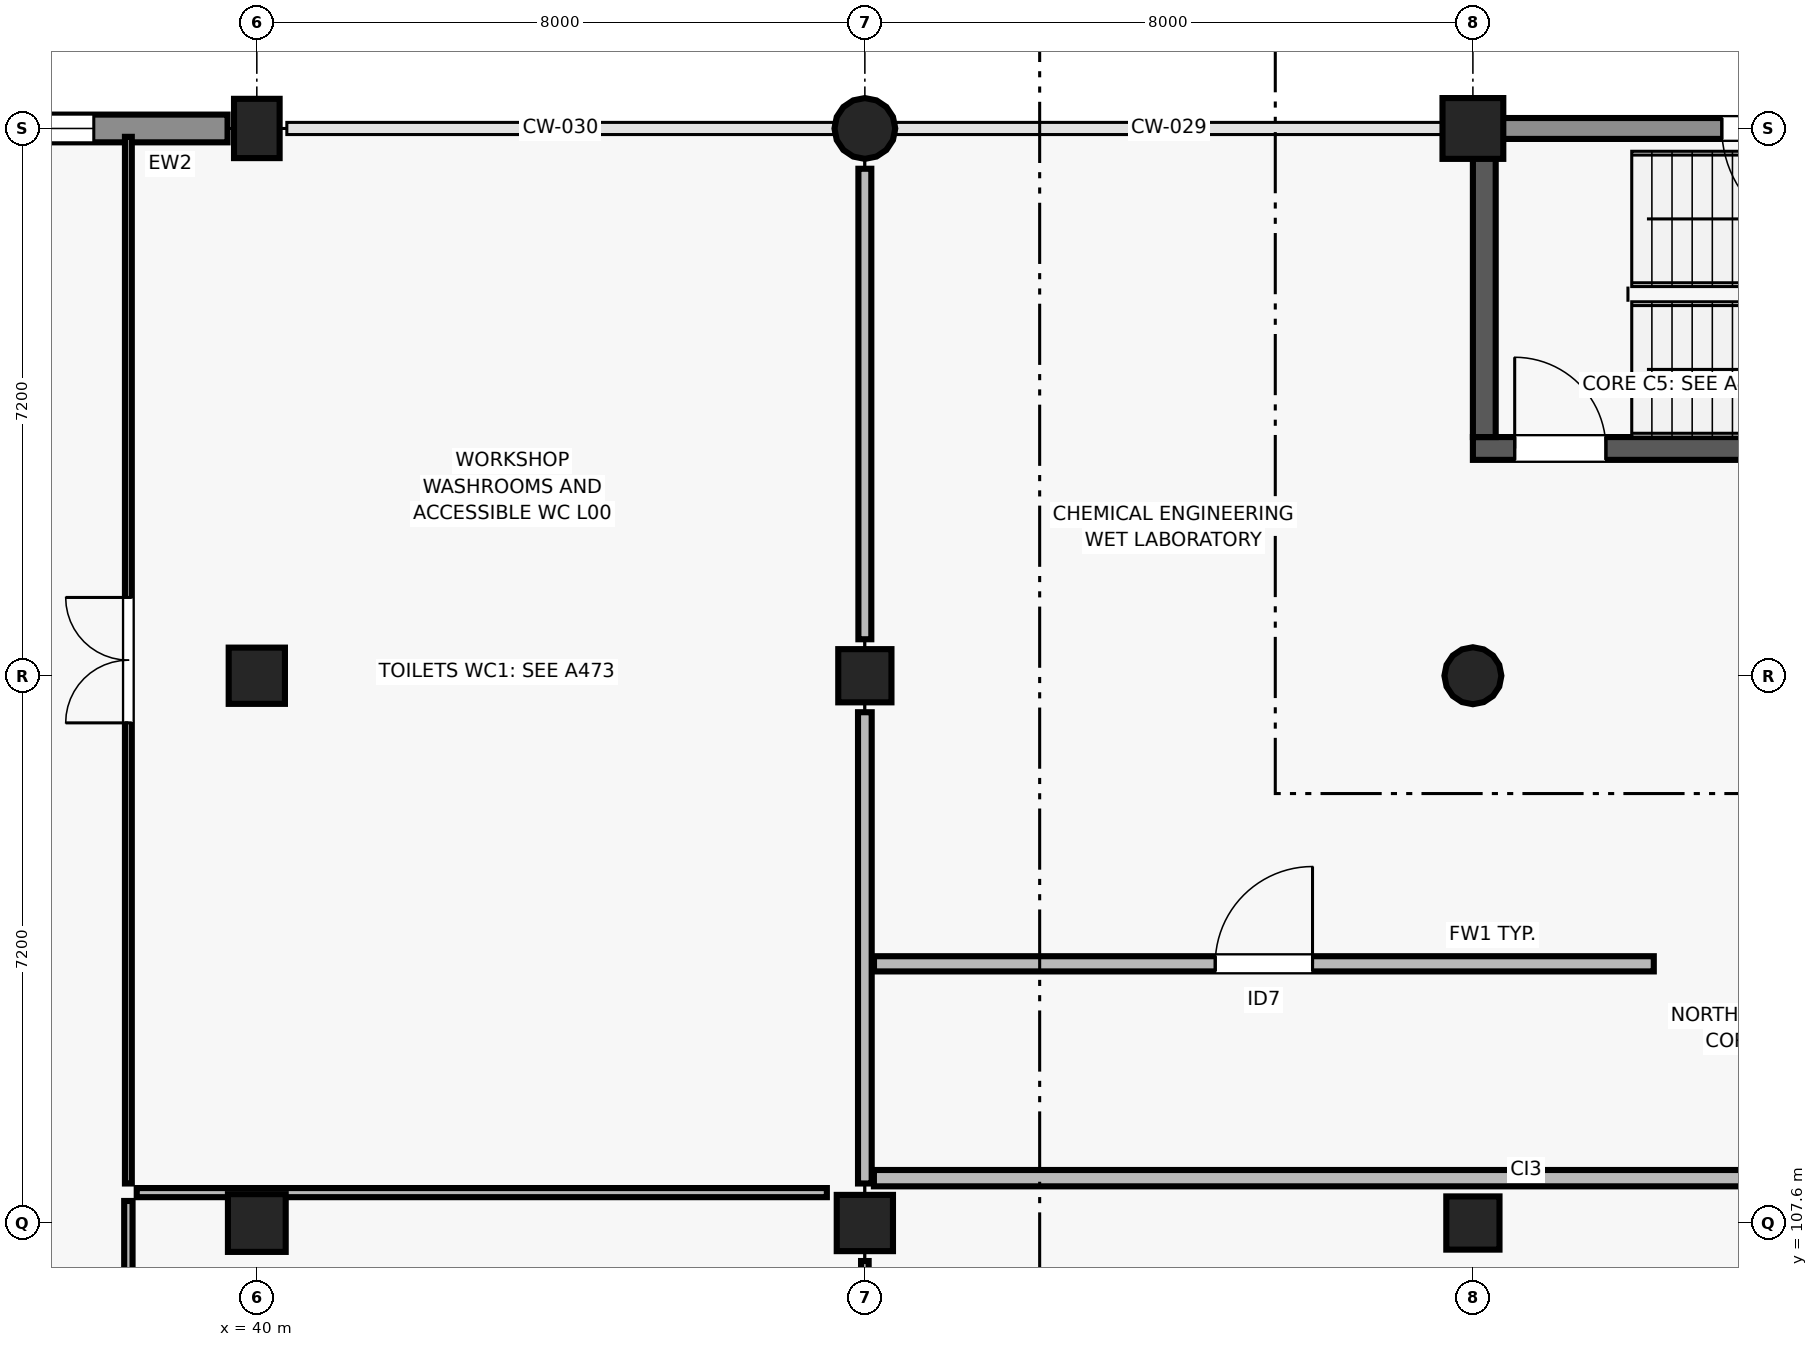
"""IFC4 building model, lengths in metres.
Left out: names, types, materials, properties, quantities, classifications, styles, units other than length and angle.
Written with IfcOpenShell. Run it as: python <this file> out.ifc"""

import sys

from ifc_helpers import new_model, si_unit, direction, frame, frame_2d, origin, origin_2d, place, context, subcontext, project, spatial, rectangle, circle, extrude, element, fill, save


model = new_model("IFC4")
c1 = context("Model", 3, precision=1e-05, world=origin(), true_north=direction((0.0, 1.0)))
c2 = subcontext(c1, "Body", "Model", "MODEL_VIEW")
j1 = project(units=[si_unit("LENGTHUNIT", "METRE"), si_unit("PLANEANGLEUNIT", "RADIAN")], contexts=[c1])
p1 = place(None, origin())
s1 = spatial("IfcSite", under=j1, at=p1, CompositionType="ELEMENT")
p2 = place(p1, origin())
s2 = spatial("IfcBuilding", under=s1, at=p2, CompositionType="ELEMENT")
p3 = place(p2, origin())
s3 = spatial("IfcBuildingStorey", under=s2, at=p3, CompositionType="ELEMENT", Elevation=0.0)
p4 = place(p3, frame((40.0, 107.6, 0.0), z_axis=(0.0, 0.0, 1.0), x_axis=(1.0, 0.0, 0.0)))
e1 = element("IfcColumn", 1, at=p4, inside=s3, PredefinedType="COLUMN", context=c2, shape_type="SweptSolid", body=[
    extrude(rectangle(XDim=0.76, YDim=0.76, at=origin_2d()), origin(), (0.0, 0.0, 1.0), 4.5),
])
p5 = place(p3, frame((40.0, 114.8, 0.0), z_axis=(0.0, 0.0, 1.0), x_axis=(1.0, 0.0, 0.0)))
e2 = element("IfcColumn", 2, at=p5, inside=s3, PredefinedType="COLUMN", context=c2, shape_type="SweptSolid", body=[
    extrude(rectangle(XDim=0.74, YDim=0.74, at=origin_2d()), origin(), (0.0, 0.0, 1.0), 4.5),
])
p6 = place(p3, frame((40.0, 122.0, 0.0), z_axis=(0.0, 0.0, 1.0), x_axis=(1.0, 0.0, 0.0)))
e3 = element("IfcColumn", 3, at=p6, inside=s3, PredefinedType="COLUMN", context=c2, shape_type="SweptSolid", body=[
    extrude(rectangle(XDim=0.78, YDim=0.6, at=origin_2d()), origin(), (0.0, 0.0, 1.0), 4.5),
])
p7 = place(p3, frame((48.0, 107.6, 0.0), z_axis=(0.0, 0.0, 1.0), x_axis=(1.0, 0.0, 0.0)))
e4 = element("IfcColumn", 4, at=p7, inside=s3, PredefinedType="COLUMN", context=c2, shape_type="SweptSolid", body=[
    extrude(rectangle(XDim=0.74, YDim=0.74, at=origin_2d()), origin(), (0.0, 0.0, 1.0), 4.5),
])
p8 = place(p3, frame((48.0, 114.8, 0.0), z_axis=(0.0, 0.0, 1.0), x_axis=(1.0, 0.0, 0.0)))
e5 = element("IfcColumn", 5, at=p8, inside=s3, PredefinedType="COLUMN", context=c2, shape_type="SweptSolid", body=[
    extrude(rectangle(XDim=0.7, YDim=0.7, at=origin_2d()), origin(), (0.0, 0.0, 1.0), 4.5),
])
p9 = place(p3, frame((48.0, 122.0, 0.0), z_axis=(0.0, 0.0, 1.0), x_axis=(1.0, 0.0, 0.0)))
e6 = element("IfcColumn", 6, at=p9, inside=s3, PredefinedType="COLUMN", context=c2, shape_type="SweptSolid", body=[
    extrude(circle(Radius=0.4, at=origin_2d()), origin(), (0.0, 0.0, 1.0), 4.5),
])
p10 = place(p3, frame((56.0, 107.6, 0.0), z_axis=(0.0, 0.0, 1.0), x_axis=(1.0, 0.0, 0.0)))
e7 = element("IfcColumn", 7, at=p10, inside=s3, PredefinedType="COLUMN", context=c2, shape_type="SweptSolid", body=[
    extrude(rectangle(XDim=0.7, YDim=0.7, at=origin_2d()), origin(), (0.0, 0.0, 1.0), 4.5),
])
p11 = place(p3, frame((56.0, 114.8, 0.0), z_axis=(0.0, 0.0, 1.0), x_axis=(1.0, 0.0, 0.0)))
e8 = element("IfcColumn", 8, at=p11, inside=s3, PredefinedType="COLUMN", context=c2, shape_type="SweptSolid", body=[
    extrude(circle(Radius=0.375, at=origin_2d()), origin(), (0.0, 0.0, 1.0), 4.5),
])
p12 = place(p3, frame((56.0, 122.0, 0.0), z_axis=(0.0, 0.0, 1.0), x_axis=(1.0, 0.0, 0.0)))
e9 = element("IfcColumn", 9, at=p12, inside=s3, PredefinedType="COLUMN", context=c2, shape_type="SweptSolid", body=[
    extrude(rectangle(XDim=0.8, YDim=0.8, at=origin_2d()), origin(), (0.0, 0.0, 1.0), 4.5),
])
p13 = place(p3, frame((63.605, 122.0, 0.0), z_axis=(0.0, 0.0, 1.0), x_axis=(-1.0, 0.0, 0.0)))
e10 = element("IfcWall", 10, at=p13, inside=s3, PredefinedType="SOLIDWALL", context=c2, shape_type="SweptSolid", body=[
    extrude(rectangle(XDim=7.21, YDim=0.275, at=frame_2d((3.605, 0.0))), origin(), (0.0, 0.0, 1.0), 4.22),
])
p14 = place(p13, frame((2.88, 0.0, 0.0)))
e11 = element("IfcOpeningElement", 11, at=p14, cuts=e10, PredefinedType="OPENING", context=c2, shape_type="SweptSolid", body=[
    extrude(rectangle(XDim=1.45, YDim=2.2, at=frame_2d((0.725, 1.1))), frame((0.0, 0.147, 0.0), z_axis=(0.0, -1.0, 0.0), x_axis=(1.0, 0.0, 0.0)), (0.0, 0.0, 1.0), 0.295),
])
p15 = place(p3, frame((39.615, 122.0, 0.0), z_axis=(0.0, 0.0, 1.0), x_axis=(-1.0, 0.0, 0.0)))
e12 = element("IfcWall", 12, at=p15, inside=s3, PredefinedType="SOLIDWALL", context=c2, shape_type="SweptSolid", body=[
    extrude(rectangle(XDim=7.22, YDim=0.365, at=frame_2d((3.61, 0.0))), origin(), (0.0, 0.0, 1.0), 3.57),
])
p16 = place(p15, frame((1.76, 0.0, 0.9)))
e13 = element("IfcOpeningElement", 13, at=p16, cuts=e12, PredefinedType="OPENING", context=c2, shape_type="SweptSolid", body=[
    extrude(rectangle(XDim=2.0, YDim=1.5, at=frame_2d((1.0, 0.75))), frame((0.0, 0.192, 0.0), z_axis=(0.0, -1.0, 0.0), x_axis=(1.0, 0.0, 0.0)), (0.0, 0.0, 1.0), 0.385),
])
p17 = place(p15, frame((4.817, 0.0, 0.9)))
e14 = element("IfcOpeningElement", 14, at=p17, cuts=e12, PredefinedType="OPENING", context=c2, shape_type="SweptSolid", body=[
    extrude(rectangle(XDim=1.8, YDim=1.5, at=frame_2d((0.9, 0.75))), frame((0.0, 0.192, 0.0), z_axis=(0.0, -1.0, 0.0), x_axis=(1.0, 0.0, 0.0)), (0.0, 0.0, 1.0), 0.385),
])
p18 = place(p3, frame((56.0, 117.79, 0.0), z_axis=(0.0, 0.0, 1.0), x_axis=(1.0, 0.0, 0.0)))
e15 = element("IfcWall", 15, at=p18, inside=s3, PredefinedType="SHEAR", context=c2, shape_type="SweptSolid", body=[
    extrude(rectangle(XDim=8.0, YDim=0.3, at=frame_2d((4.0, 0.0))), origin(), (0.0, 0.0, 1.0), 4.22),
])
p19 = place(p18, frame((0.55, 0.0, 0.0)))
e16 = element("IfcOpeningElement", 16, at=p19, cuts=e15, PredefinedType="OPENING", context=c2, shape_type="SweptSolid", body=[
    extrude(rectangle(XDim=1.2, YDim=2.2, at=frame_2d((0.6, 1.1))), frame((0.0, 0.16, 0.0), z_axis=(0.0, -1.0, 0.0), x_axis=(1.0, 0.0, 0.0)), (0.0, 0.0, 1.0), 0.32),
])
p20 = place(p3, frame((56.15, 117.94, 0.0), z_axis=(0.0, 0.0, 1.0), x_axis=(0.0, 1.0, 0.0)))
e17 = element("IfcWall", 17, at=p20, inside=s3, PredefinedType="SHEAR", context=c2, shape_type="SweptSolid", body=[
    extrude(rectangle(XDim=3.76, YDim=0.3, at=frame_2d((1.88, 0.0))), origin(), (0.0, 0.0, 1.0), 4.22),
])
p21 = place(p3, frame((38.42, 108.0, 0.0), z_axis=(0.0, 0.0, 1.0), x_axis=(1.0, 0.0, 0.0)))
e18 = element("IfcWall", 18, at=p21, inside=s3, PredefinedType="PARTITIONING", context=c2, shape_type="SweptSolid", body=[
    extrude(rectangle(XDim=9.08, YDim=0.12, at=frame_2d((4.54, 0.0))), origin(), (0.0, 0.0, 1.0), 4.2),
])
p22 = place(p3, frame((38.31, 88.12, 0.0), z_axis=(0.0, 0.0, 1.0), x_axis=(0.0, 1.0, 0.0)))
e19 = element("IfcWall", 19, at=p22, inside=s3, PredefinedType="PARTITIONING", context=c2, shape_type="SweptSolid", body=[
    extrude(rectangle(XDim=19.77, YDim=0.11, at=frame_2d((9.885, 0.0))), origin(), (0.0, 0.0, 1.0), 4.2),
])
p23 = place(p22, frame((9.425, 0.0, 0.0)))
e20 = element("IfcOpeningElement", 20, at=p23, cuts=e19, PredefinedType="OPENING", context=c2, shape_type="SweptSolid", body=[
    extrude(rectangle(XDim=0.92, YDim=2.1, at=frame_2d((0.46, 1.05))), frame((0.0, 0.065, 0.0), z_axis=(0.0, -1.0, 0.0), x_axis=(1.0, 0.0, 0.0)), (0.0, 0.0, 1.0), 0.13),
])
p24 = place(p3, frame((48.0, 100.93, 0.0), z_axis=(0.0, 0.0, 1.0), x_axis=(0.0, 1.0, 0.0)))
e21 = element("IfcWall", 21, at=p24, inside=s3, PredefinedType="PARTITIONING", context=c2, shape_type="SweptSolid", body=[
    extrude(rectangle(XDim=6.17, YDim=0.1, at=frame_2d((3.085, 0.0))), origin(), (0.0, 0.0, 1.0), 3.74),
])
p25 = place(p3, frame((38.31, 108.12, 0.0), z_axis=(0.0, 0.0, 1.0), x_axis=(0.0, 1.0, 0.0)))
e22 = element("IfcWall", 22, at=p25, inside=s3, PredefinedType="PARTITIONING", context=c2, shape_type="SweptSolid", body=[
    extrude(rectangle(XDim=13.77, YDim=0.09, at=frame_2d((6.885, 0.0))), origin(), (0.0, 0.0, 1.0), 4.2),
])
p26 = place(p25, frame((6.06, 0.0, 0.0)))
e23 = element("IfcOpeningElement", 23, at=p26, cuts=e22, PredefinedType="OPENING", context=c2, shape_type="SweptSolid", body=[
    extrude(rectangle(XDim=1.65, YDim=2.3, at=frame_2d((0.825, 1.15))), frame((0.0, 0.055, 0.0), z_axis=(0.0, -1.0, 0.0), x_axis=(1.0, 0.0, 0.0)), (0.0, 0.0, 1.0), 0.11),
])
p27 = place(p3, frame((48.0, 108.12, 0.0), z_axis=(0.0, 0.0, 1.0), x_axis=(0.0, 1.0, 0.0)))
e24 = element("IfcWall", 24, at=p27, inside=s3, PredefinedType="PARTITIONING", context=c2, shape_type="SweptSolid", body=[
    extrude(rectangle(XDim=6.2, YDim=0.18, at=frame_2d((3.1, 0.0))), origin(), (0.0, 0.0, 1.0), 3.77),
])
p28 = place(p3, frame((48.0, 115.28, 0.0), z_axis=(0.0, 0.0, 1.0), x_axis=(0.0, 1.0, 0.0)))
e25 = element("IfcWall", 25, at=p28, inside=s3, PredefinedType="PARTITIONING", context=c2, shape_type="SweptSolid", body=[
    extrude(rectangle(XDim=6.19, YDim=0.17, at=frame_2d((3.095, 0.0))), origin(), (0.0, 0.0, 1.0), 3.54),
])
p29 = place(p3, frame((48.119, 108.19, 0.0), z_axis=(0.0, 0.0, 1.0), x_axis=(1.0, 0.0, 0.0)))
e26 = element("IfcWall", 26, at=p29, inside=s3, PredefinedType="PARTITIONING", context=c2, shape_type="SweptSolid", body=[
    extrude(rectangle(XDim=27.771, YDim=0.215, at=frame_2d((13.885, 0.0))), origin(), (0.0, 0.0, 1.0), 4.2),
])
p30 = place(p29, frame((13.245, 0.0, 0.0)))
e27 = element("IfcOpeningElement", 27, at=p30, cuts=e26, PredefinedType="OPENING", context=c2, shape_type="SweptSolid", body=[
    extrude(rectangle(XDim=1.28, YDim=2.2, at=frame_2d((0.64, 1.1))), frame((0.0, 0.117, 0.0), z_axis=(0.0, -1.0, 0.0), x_axis=(1.0, 0.0, 0.0)), (0.0, 0.0, 1.0), 0.235),
])
p31 = place(p3, frame((48.12, 111.01, 0.0), z_axis=(0.0, 0.0, 1.0), x_axis=(1.0, 0.0, 0.0)))
e28 = element("IfcWall", 28, at=p31, inside=s3, PredefinedType="SOLIDWALL", context=c2, shape_type="SweptSolid", body=[
    extrude(rectangle(XDim=10.26, YDim=0.2, at=frame_2d((5.13, 0.0))), origin(), (0.0, 0.0, 1.0), 3.76),
])
p32 = place(p31, frame((4.49, 0.0, 0.0)))
e29 = element("IfcOpeningElement", 29, at=p32, cuts=e28, PredefinedType="OPENING", context=c2, shape_type="SweptSolid", body=[
    extrude(rectangle(XDim=1.28, YDim=2.2, at=frame_2d((0.64, 1.1))), frame((0.0, 0.11, 0.0), z_axis=(0.0, -1.0, 0.0), x_axis=(1.0, 0.0, 0.0)), (0.0, 0.0, 1.0), 0.22),
])
p33 = place(p14, frame((1.45, 0.0, 0.0), z_axis=(0.0, 0.0, 1.0), x_axis=(-1.0, 0.0, 0.0)))
e30 = element("IfcDoor", 30, at=p33, inside=s3, OperationType="SINGLE_SWING_LEFT", PredefinedType="DOOR", context=c2, shape_type="SweptSolid", body=[
    extrude(rectangle(XDim=1.45, YDim=2.2, at=frame_2d((0.725, 1.1))), frame((0.0, 0.025, 0.0), z_axis=(0.0, -1.0, 0.0), x_axis=(1.0, 0.0, 0.0)), (0.0, 0.0, 1.0), 0.05),
])
fill(e11, e30)
p34 = place(p16, origin())
e31 = element("IfcWindow", 31, at=p34, inside=s3, PartitioningType="SINGLE_PANEL", PredefinedType="WINDOW", context=c2, shape_type="SweptSolid", body=[
    extrude(rectangle(XDim=2.0, YDim=1.5, at=frame_2d((1.0, 0.75))), frame((0.0, 0.03, 0.0), z_axis=(0.0, -1.0, 0.0), x_axis=(1.0, 0.0, 0.0)), (0.0, 0.0, 1.0), 0.06),
])
fill(e13, e31)
p35 = place(p19, origin())
e32 = element("IfcDoor", 32, at=p35, inside=s3, OperationType="SINGLE_SWING_LEFT", PredefinedType="DOOR", context=c2, shape_type="SweptSolid", body=[
    extrude(rectangle(XDim=1.2, YDim=2.2, at=frame_2d((0.6, 1.1))), frame((0.0, 0.025, 0.0), z_axis=(0.0, -1.0, 0.0), x_axis=(1.0, 0.0, 0.0)), (0.0, 0.0, 1.0), 0.05),
])
fill(e16, e32)
p36 = place(p26, origin())
e33 = element("IfcDoor", 33, at=p36, inside=s3, OperationType="DOUBLE_DOOR_SINGLE_SWING", PredefinedType="DOOR", context=c2, shape_type="SweptSolid", body=[
    extrude(rectangle(XDim=1.65, YDim=2.3, at=frame_2d((0.825, 1.15))), frame((0.0, 0.025, 0.0), z_axis=(0.0, -1.0, 0.0), x_axis=(1.0, 0.0, 0.0)), (0.0, 0.0, 1.0), 0.05),
])
fill(e23, e33)
p37 = place(p32, origin())
e34 = element("IfcDoor", 34, at=p37, inside=s3, OperationType="SINGLE_SWING_RIGHT", PredefinedType="DOOR", context=c2, shape_type="SweptSolid", body=[
    extrude(rectangle(XDim=1.28, YDim=2.2, at=frame_2d((0.64, 1.1))), frame((0.0, 0.025, 0.0), z_axis=(0.0, -1.0, 0.0), x_axis=(1.0, 0.0, 0.0)), (0.0, 0.0, 1.0), 0.05),
])
fill(e29, e34)
save(model, sys.argv[1])
